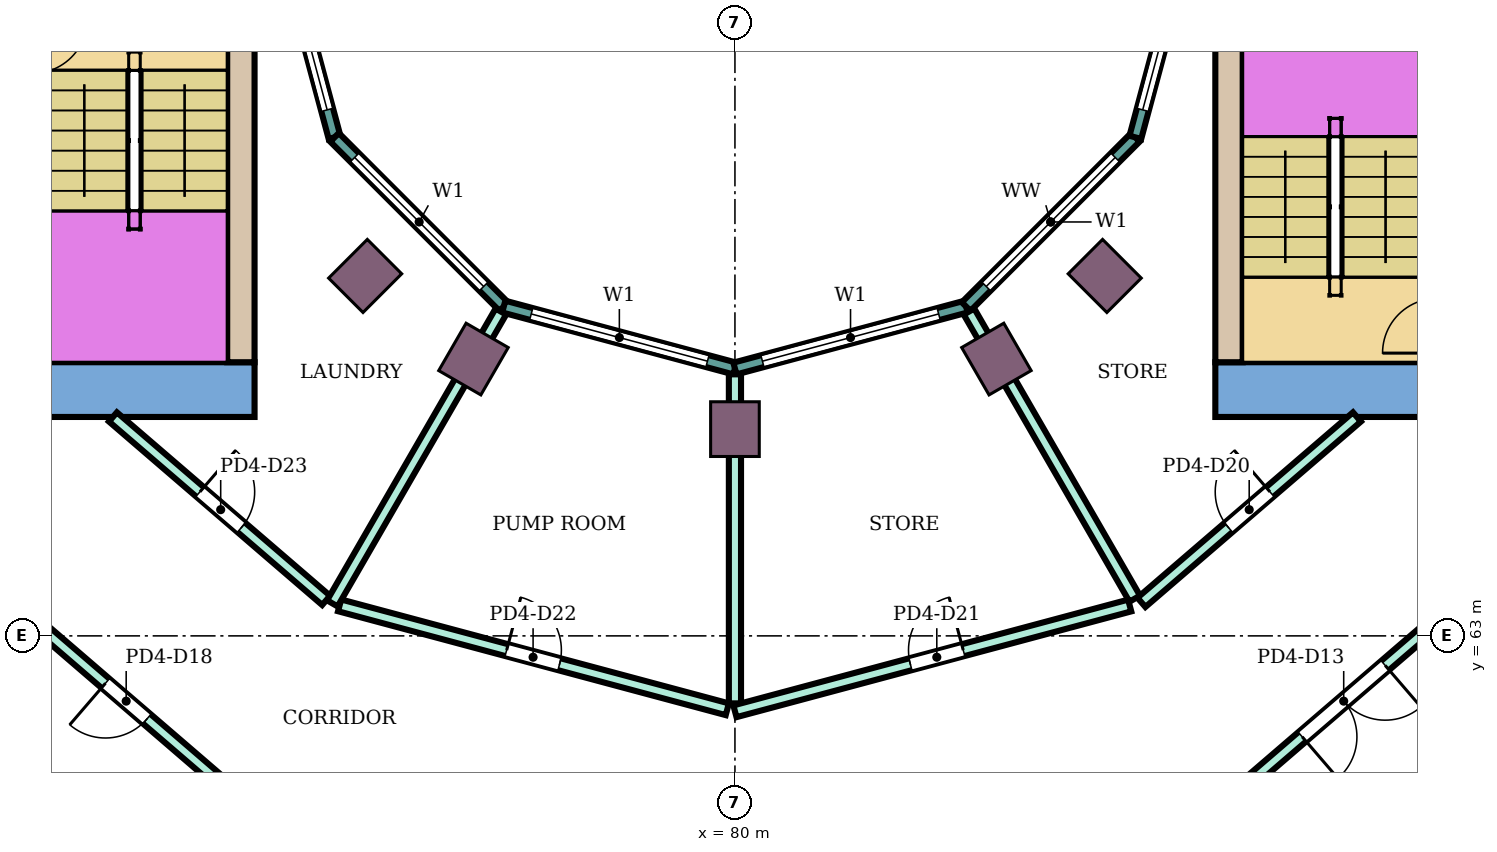
"""IFC4 building model, lengths in metres.
Left out: names, types, materials, properties, quantities, classifications, styles, units other than length and angle.
Written with IfcOpenShell. Run it as: python <this file> out.ifc"""

import sys

from ifc_helpers import new_model, si_unit, direction, frame, frame_2d, origin, origin_2d, place, context, subcontext, project, spatial, rectangle, extrude, element, fill, save


model = new_model("IFC4")
c1 = context("Model", 3, precision=1e-05, world=origin(), true_north=direction((0.0, 1.0)))
c2 = subcontext(c1, "Body", "Model", "MODEL_VIEW")
j1 = project(units=[si_unit("LENGTHUNIT", "METRE"), si_unit("PLANEANGLEUNIT", "RADIAN")], contexts=[c1])
p1 = place(None, origin())
s1 = spatial("IfcSite", under=j1, at=p1, CompositionType="ELEMENT")
p2 = place(p1, origin())
s2 = spatial("IfcBuilding", under=s1, at=p2, CompositionType="ELEMENT")
p3 = place(p2, frame((0.0, 0.0, 23.8)))
s3 = spatial("IfcBuildingStorey", under=s2, at=p3, CompositionType="ELEMENT", Elevation=23.8)
for number, where, z_axis, x_axis in (
    (1, (73.919, 68.919, 0.0), (0.0, 0.0, 1.0), (-0.707, -0.707, 0.0)),
    (2, (75.7, 67.552, 0.0), (0.0, 0.0, 1.0), (-0.5, -0.866, 0.0)),
    (3, (80.0, 66.4, 0.0), (0.0, 0.0, 1.0), (0.0, -1.0, 0.0)),
    (4, (84.3, 67.552, 0.0), (0.0, 0.0, 1.0), (0.5, -0.866, 0.0)),
    (5, (86.081, 68.919, 0.0), (0.0, 0.0, 1.0), (0.707, -0.707, 0.0)),
):
    element("IfcColumn", number, at=place(p3, frame(where, z_axis=z_axis, x_axis=x_axis)), inside=s3, PredefinedType="COLUMN", context=c2, shape_type="SweptSolid", body=[
        extrude(rectangle(XDim=0.9, YDim=0.8, at=origin_2d()), origin(), (0.0, 0.0, 1.0), 5.0),
    ])
p4 = place(p3, frame((87.9, 67.05, 0.0), z_axis=(0.0, 0.0, 1.0), x_axis=(1.0, 0.0, 0.0)))
e6 = element("IfcWall", 6, at=p4, inside=s3, PredefinedType="SHEAR", context=c2, shape_type="SweptSolid", body=[
    extrude(rectangle(XDim=14.6, YDim=0.9, at=frame_2d((7.3, 0.0))), origin(), (0.0, 0.0, 1.0), 4.68),
])
p5 = place(p4, frame((4.2, 0.0, 0.0)))
e7 = element("IfcOpeningElement", 7, at=p5, cuts=e6, PredefinedType="OPENING", context=c2, shape_type="SweptSolid", body=[
    extrude(rectangle(XDim=2.4, YDim=2.4, at=frame_2d((1.2, 1.2))), frame((0.0, 0.46, 0.0), z_axis=(0.0, -1.0, 0.0), x_axis=(1.0, 0.0, 0.0)), (0.0, 0.0, 1.0), 0.92),
])
p6 = place(p3, frame((88.125, 67.5, 0.0), z_axis=(0.0, 0.0, 1.0), x_axis=(0.0, 1.0, 0.0)))
e8 = element("IfcWall", 8, at=p6, inside=s3, PredefinedType="SHEAR", context=c2, shape_type="SweptSolid", body=[
    extrude(rectangle(XDim=7.5, YDim=0.45, at=frame_2d((3.75, 0.0))), origin(), (0.0, 0.0, 1.0), 4.68),
])
p7 = place(p3, frame((72.1, 67.05, 0.0), z_axis=(0.0, 0.0, 1.0), x_axis=(-1.0, 0.0, 0.0)))
e9 = element("IfcWall", 9, at=p7, inside=s3, PredefinedType="SHEAR", context=c2, shape_type="SweptSolid", body=[
    extrude(rectangle(XDim=14.6, YDim=0.9, at=frame_2d((7.3, 0.0))), origin(), (0.0, 0.0, 1.0), 4.68),
])
p8 = place(p7, frame((4.2, 0.0, 0.0)))
e10 = element("IfcOpeningElement", 10, at=p8, cuts=e9, PredefinedType="OPENING", context=c2, shape_type="SweptSolid", body=[
    extrude(rectangle(XDim=2.4, YDim=2.4, at=frame_2d((1.2, 1.2))), frame((0.0, 0.46, 0.0), z_axis=(0.0, -1.0, 0.0), x_axis=(1.0, 0.0, 0.0)), (0.0, 0.0, 1.0), 0.92),
])
p9 = place(p3, frame((71.875, 75.0, 0.0), z_axis=(0.0, 0.0, 1.0), x_axis=(0.0, -1.0, 0.0)))
e11 = element("IfcWall", 11, at=p9, inside=s3, PredefinedType="SHEAR", context=c2, shape_type="SweptSolid", body=[
    extrude(rectangle(XDim=7.5, YDim=0.45, at=frame_2d((3.75, 0.0))), origin(), (0.0, 0.0, 1.0), 4.68),
])
p10 = place(p3, frame((72.396, 75.0, 0.0), z_axis=(0.0, 0.0, 1.0), x_axis=(0.258789828301, -0.965933654434, 0.0)))
e12 = element("IfcWall", 12, at=p10, inside=s3, PredefinedType="NOTDEFINED", context=c2, shape_type="SweptSolid", body=[
    extrude(rectangle(XDim=3.936, YDim=0.2, at=frame_2d((1.968, 0.0))), origin(), (0.0, 0.0, 1.0), 5.0),
])
p11 = place(p10, frame((0.468, 0.0, 0.9)))
e13 = element("IfcOpeningElement", 13, at=p11, cuts=e12, PredefinedType="OPENING", context=c2, shape_type="SweptSolid", body=[
    extrude(rectangle(XDim=3.0, YDim=2.3, at=frame_2d((1.5, 1.15))), frame((0.0, 0.11, 0.0), z_axis=(0.0, -1.0, 0.0), x_axis=(1.0, 0.0, 0.0)), (0.0, 0.0, 1.0), 0.22),
])
p12 = place(p3, frame((73.415, 71.198, 0.0), z_axis=(0.0, 0.0, 1.0), x_axis=(0.707106781187, -0.707106781187, 0.0)))
e14 = element("IfcWall", 14, at=p12, inside=s3, PredefinedType="NOTDEFINED", context=c2, shape_type="SweptSolid", body=[
    extrude(rectangle(XDim=3.936, YDim=0.2, at=frame_2d((1.968, 0.0))), origin(), (0.0, 0.0, 1.0), 5.0),
])
p13 = place(p12, frame((0.468, 0.0, 0.9)))
e15 = element("IfcOpeningElement", 15, at=p13, cuts=e14, PredefinedType="OPENING", context=c2, shape_type="SweptSolid", body=[
    extrude(rectangle(XDim=3.0, YDim=2.3, at=frame_2d((1.5, 1.15))), frame((0.0, 0.11, 0.0), z_axis=(0.0, -1.0, 0.0), x_axis=(1.0, 0.0, 0.0)), (0.0, 0.0, 1.0), 0.22),
])
p14 = place(p3, frame((76.198, 68.415, 0.0), z_axis=(0.0, 0.0, 1.0), x_axis=(0.965933654434, -0.258789828301, 0.0)))
e16 = element("IfcWall", 16, at=p14, inside=s3, PredefinedType="NOTDEFINED", context=c2, shape_type="SweptSolid", body=[
    extrude(rectangle(XDim=3.936, YDim=0.2, at=frame_2d((1.968, 0.0))), origin(), (0.0, 0.0, 1.0), 5.0),
])
p15 = place(p14, frame((0.468, 0.0, 0.9)))
e17 = element("IfcOpeningElement", 17, at=p15, cuts=e16, PredefinedType="OPENING", context=c2, shape_type="SweptSolid", body=[
    extrude(rectangle(XDim=3.0, YDim=2.3, at=frame_2d((1.5, 1.15))), frame((0.0, 0.11, 0.0), z_axis=(0.0, -1.0, 0.0), x_axis=(1.0, 0.0, 0.0)), (0.0, 0.0, 1.0), 0.22),
])
p16 = place(p3, frame((80.0, 67.396, 0.0), z_axis=(0.0, 0.0, 1.0), x_axis=(0.965933654434, 0.258789828301, 0.0)))
e18 = element("IfcWall", 18, at=p16, inside=s3, PredefinedType="NOTDEFINED", context=c2, shape_type="SweptSolid", body=[
    extrude(rectangle(XDim=3.936, YDim=0.2, at=frame_2d((1.968, 0.0))), origin(), (0.0, 0.0, 1.0), 5.0),
])
p17 = place(p16, frame((0.468, 0.0, 0.9)))
e19 = element("IfcOpeningElement", 19, at=p17, cuts=e18, PredefinedType="OPENING", context=c2, shape_type="SweptSolid", body=[
    extrude(rectangle(XDim=3.0, YDim=2.3, at=frame_2d((1.5, 1.15))), frame((0.0, 0.11, 0.0), z_axis=(0.0, -1.0, 0.0), x_axis=(1.0, 0.0, 0.0)), (0.0, 0.0, 1.0), 0.22),
])
p18 = place(p3, frame((83.802, 68.415, 0.0), z_axis=(0.0, 0.0, 1.0), x_axis=(0.707106781187, 0.707106781187, 0.0)))
e20 = element("IfcWall", 20, at=p18, inside=s3, PredefinedType="NOTDEFINED", context=c2, shape_type="SweptSolid", body=[
    extrude(rectangle(XDim=3.936, YDim=0.2, at=frame_2d((1.968, 0.0))), origin(), (0.0, 0.0, 1.0), 5.0),
])
p19 = place(p18, frame((0.468, 0.0, 0.9)))
e21 = element("IfcOpeningElement", 21, at=p19, cuts=e20, PredefinedType="OPENING", context=c2, shape_type="SweptSolid", body=[
    extrude(rectangle(XDim=3.0, YDim=2.3, at=frame_2d((1.5, 1.15))), frame((0.0, 0.11, 0.0), z_axis=(0.0, -1.0, 0.0), x_axis=(1.0, 0.0, 0.0)), (0.0, 0.0, 1.0), 0.22),
])
p20 = place(p3, frame((86.585, 71.198, 0.0), z_axis=(0.0, 0.0, 1.0), x_axis=(0.258789828301, 0.965933654434, 0.0)))
e22 = element("IfcWall", 22, at=p20, inside=s3, PredefinedType="NOTDEFINED", context=c2, shape_type="SweptSolid", body=[
    extrude(rectangle(XDim=3.936, YDim=0.2, at=frame_2d((1.968, 0.0))), origin(), (0.0, 0.0, 1.0), 5.0),
])
p21 = place(p20, frame((0.468, 0.0, 0.9)))
e23 = element("IfcOpeningElement", 23, at=p21, cuts=e22, PredefinedType="OPENING", context=c2, shape_type="SweptSolid", body=[
    extrude(rectangle(XDim=3.0, YDim=2.3, at=frame_2d((1.5, 1.15))), frame((0.0, 0.11, 0.0), z_axis=(0.0, -1.0, 0.0), x_axis=(1.0, 0.0, 0.0)), (0.0, 0.0, 1.0), 0.22),
])
p22 = place(p3, frame((66.302, 65.1, 0.0), z_axis=(0.0, 0.0, 1.0), x_axis=(0.757895579626, -0.652375881209, 0.0)))
e24 = element("IfcWall", 24, at=p22, inside=s3, PredefinedType="PARTITIONING", context=c2, shape_type="SweptSolid", body=[
    extrude(rectangle(XDim=7.062, YDim=0.2, at=frame_2d((3.531, 0.0))), origin(), (0.0, 0.0, 1.0), 4.55),
])
p23 = place(p22, frame((4.414, 0.0, 0.0)))
e25 = element("IfcOpeningElement", 25, at=p23, cuts=e24, PredefinedType="OPENING", context=c2, shape_type="SweptSolid", body=[
    extrude(rectangle(XDim=0.9, YDim=2.1, at=frame_2d((0.45, 1.05))), frame((0.0, 0.11, 0.0), z_axis=(0.0, -1.0, 0.0), x_axis=(1.0, 0.0, 0.0)), (0.0, 0.0, 1.0), 0.22),
])
p24 = place(p22, frame((0.906, 0.0, 0.0)))
e26 = element("IfcOpeningElement", 26, at=p24, cuts=e24, PredefinedType="OPENING", context=c2, shape_type="SweptSolid", body=[
    extrude(rectangle(XDim=0.9, YDim=2.1, at=frame_2d((0.45, 1.05))), frame((0.0, 0.11, 0.0), z_axis=(0.0, -1.0, 0.0), x_axis=(1.0, 0.0, 0.0)), (0.0, 0.0, 1.0), 0.22),
])
p25 = place(p3, frame((69.771, 66.6, 0.0), z_axis=(0.0, 0.0, 1.0), x_axis=(0.758040611529, -0.652207352974, 0.0)))
e27 = element("IfcWall", 27, at=p25, inside=s3, PredefinedType="PARTITIONING", context=c2, shape_type="SweptSolid", body=[
    extrude(rectangle(XDim=4.625, YDim=0.2, at=frame_2d((2.312, 0.0))), origin(), (0.0, 0.0, 1.0), 4.55),
])
p26 = place(p25, frame((1.887, 0.0, 0.0)))
e28 = element("IfcOpeningElement", 28, at=p26, cuts=e27, PredefinedType="OPENING", context=c2, shape_type="SweptSolid", body=[
    extrude(rectangle(XDim=0.9, YDim=2.1, at=frame_2d((0.45, 1.05))), frame((0.0, 0.11, 0.0), z_axis=(0.0, -1.0, 0.0), x_axis=(1.0, 0.0, 0.0)), (0.0, 0.0, 1.0), 0.22),
])
p27 = place(p3, frame((73.499, 63.502, 0.0), z_axis=(0.0, 0.0, 1.0), x_axis=(0.965923617359, -0.258827288799, 0.0)))
e29 = element("IfcWall", 29, at=p27, inside=s3, PredefinedType="PARTITIONING", context=c2, shape_type="SweptSolid", body=[
    extrude(rectangle(XDim=6.601, YDim=0.2, at=frame_2d((3.3, 0.0))), origin(), (0.0, 0.0, 1.0), 4.55),
])
p28 = place(p27, frame((2.844, 0.0, 0.0)))
e30 = element("IfcOpeningElement", 30, at=p28, cuts=e29, PredefinedType="OPENING", context=c2, shape_type="SweptSolid", body=[
    extrude(rectangle(XDim=0.9, YDim=2.1, at=frame_2d((0.45, 1.05))), frame((0.0, 0.11, 0.0), z_axis=(0.0, -1.0, 0.0), x_axis=(1.0, 0.0, 0.0)), (0.0, 0.0, 1.0), 0.22),
])
p29 = place(p3, frame((73.379, 63.534, 0.0), z_axis=(0.0, 0.0, 1.0), x_axis=(0.500052970826, 0.865994818904, 0.0)))
e31 = element("IfcWall", 31, at=p29, inside=s3, PredefinedType="PARTITIONING", context=c2, shape_type="SweptSolid", body=[
    extrude(rectangle(XDim=5.542, YDim=0.2, at=frame_2d((2.771, 0.0))), origin(), (0.0, 0.0, 1.0), 4.55),
])
p30 = place(p3, frame((80.0, 61.89, 0.0), z_axis=(0.0, 0.0, 1.0), x_axis=(0.0, 1.0, 0.0)))
e32 = element("IfcWall", 32, at=p30, inside=s3, PredefinedType="PARTITIONING", context=c2, shape_type="SweptSolid", body=[
    extrude(rectangle(XDim=5.411, YDim=0.2, at=frame_2d((2.706, 0.0))), origin(), (0.0, 0.0, 1.0), 4.55),
])
p31 = place(p3, frame((80.0, 61.76, 0.0), z_axis=(0.0, 0.0, 1.0), x_axis=(0.965932810031, 0.258792980017, 0.0)))
e33 = element("IfcWall", 33, at=p31, inside=s3, PredefinedType="PARTITIONING", context=c2, shape_type="SweptSolid", body=[
    extrude(rectangle(XDim=6.721, YDim=0.2, at=frame_2d((3.36, 0.0))), origin(), (0.0, 0.0, 1.0), 4.55),
])
p32 = place(p31, frame((2.987, 0.0, 0.0)))
e34 = element("IfcOpeningElement", 34, at=p32, cuts=e33, PredefinedType="OPENING", context=c2, shape_type="SweptSolid", body=[
    extrude(rectangle(XDim=0.9, YDim=2.1, at=frame_2d((0.45, 1.05))), frame((0.0, 0.11, 0.0), z_axis=(0.0, -1.0, 0.0), x_axis=(1.0, 0.0, 0.0)), (0.0, 0.0, 1.0), 0.22),
])
p33 = place(p3, frame((83.849, 68.333, 0.0), z_axis=(0.0, 0.0, 1.0), x_axis=(0.500006734102, -0.866021515814, 0.0)))
e35 = element("IfcWall", 35, at=p33, inside=s3, PredefinedType="PARTITIONING", context=c2, shape_type="SweptSolid", body=[
    extrude(rectangle(XDim=5.452, YDim=0.2, at=frame_2d((2.726, 0.0))), origin(), (0.0, 0.0, 1.0), 4.55),
])
p34 = place(p3, frame((86.685, 63.551, 0.0), z_axis=(0.0, 0.0, 1.0), x_axis=(0.758049900748, 0.652196556244, 0.0)))
e36 = element("IfcWall", 36, at=p34, inside=s3, PredefinedType="PARTITIONING", context=c2, shape_type="SweptSolid", body=[
    extrude(rectangle(XDim=4.675, YDim=0.2, at=frame_2d((2.337, 0.0))), origin(), (0.0, 0.0, 1.0), 4.55),
])
p35 = place(p34, frame((1.887, 0.0, 0.0)))
e37 = element("IfcOpeningElement", 37, at=p35, cuts=e36, PredefinedType="OPENING", context=c2, shape_type="SweptSolid", body=[
    extrude(rectangle(XDim=0.9, YDim=2.1, at=frame_2d((0.45, 1.05))), frame((0.0, 0.11, 0.0), z_axis=(0.0, -1.0, 0.0), x_axis=(1.0, 0.0, 0.0)), (0.0, 0.0, 1.0), 0.22),
])
p36 = place(p3, frame((88.436, 60.573, 0.0), z_axis=(0.0, 0.0, 1.0), x_axis=(0.758186248639, 0.652038045189, 0.0)))
e38 = element("IfcWall", 38, at=p36, inside=s3, PredefinedType="PARTITIONING", context=c2, shape_type="SweptSolid", body=[
    extrude(rectangle(XDim=6.882, YDim=0.2, at=frame_2d((3.441, 0.0))), origin(), (0.0, 0.0, 1.0), 4.55),
])
p37 = place(p36, frame((4.835, 0.0, 0.0)))
e39 = element("IfcOpeningElement", 39, at=p37, cuts=e38, PredefinedType="OPENING", context=c2, shape_type="SweptSolid", body=[
    extrude(rectangle(XDim=1.8, YDim=2.1, at=frame_2d((0.9, 1.05))), frame((0.0, 0.11, 0.0), z_axis=(0.0, -1.0, 0.0), x_axis=(1.0, 0.0, 0.0)), (0.0, 0.0, 1.0), 0.22),
])
p38 = place(p36, frame((1.177, 0.0, 0.0)))
e40 = element("IfcOpeningElement", 40, at=p38, cuts=e38, PredefinedType="OPENING", context=c2, shape_type="SweptSolid", body=[
    extrude(rectangle(XDim=1.8, YDim=2.1, at=frame_2d((0.9, 1.05))), frame((0.0, 0.11, 0.0), z_axis=(0.0, -1.0, 0.0), x_axis=(1.0, 0.0, 0.0)), (0.0, 0.0, 1.0), 0.22),
])
p39 = place(p11, origin())
e41 = element("IfcWindow", 41, at=p39, inside=s3, PartitioningType="SINGLE_PANEL", PredefinedType="WINDOW", context=c2, shape_type="SweptSolid", body=[
    extrude(rectangle(XDim=3.0, YDim=2.3, at=frame_2d((1.5, 1.15))), frame((0.0, 0.03, 0.0), z_axis=(0.0, -1.0, 0.0), x_axis=(1.0, 0.0, 0.0)), (0.0, 0.0, 1.0), 0.06),
])
fill(e13, e41)
p40 = place(p13, origin())
e42 = element("IfcWindow", 42, at=p40, inside=s3, PartitioningType="SINGLE_PANEL", PredefinedType="WINDOW", context=c2, shape_type="SweptSolid", body=[
    extrude(rectangle(XDim=3.0, YDim=2.3, at=frame_2d((1.5, 1.15))), frame((0.0, 0.03, 0.0), z_axis=(0.0, -1.0, 0.0), x_axis=(1.0, 0.0, 0.0)), (0.0, 0.0, 1.0), 0.06),
])
fill(e15, e42)
p41 = place(p15, origin())
e43 = element("IfcWindow", 43, at=p41, inside=s3, PartitioningType="SINGLE_PANEL", PredefinedType="WINDOW", context=c2, shape_type="SweptSolid", body=[
    extrude(rectangle(XDim=3.0, YDim=2.3, at=frame_2d((1.5, 1.15))), frame((0.0, 0.03, 0.0), z_axis=(0.0, -1.0, 0.0), x_axis=(1.0, 0.0, 0.0)), (0.0, 0.0, 1.0), 0.06),
])
fill(e17, e43)
p42 = place(p17, origin())
e44 = element("IfcWindow", 44, at=p42, inside=s3, PartitioningType="SINGLE_PANEL", PredefinedType="WINDOW", context=c2, shape_type="SweptSolid", body=[
    extrude(rectangle(XDim=3.0, YDim=2.3, at=frame_2d((1.5, 1.15))), frame((0.0, 0.03, 0.0), z_axis=(0.0, -1.0, 0.0), x_axis=(1.0, 0.0, 0.0)), (0.0, 0.0, 1.0), 0.06),
])
fill(e19, e44)
p43 = place(p19, origin())
e45 = element("IfcWindow", 45, at=p43, inside=s3, PartitioningType="SINGLE_PANEL", PredefinedType="WINDOW", context=c2, shape_type="SweptSolid", body=[
    extrude(rectangle(XDim=3.0, YDim=2.3, at=frame_2d((1.5, 1.15))), frame((0.0, 0.03, 0.0), z_axis=(0.0, -1.0, 0.0), x_axis=(1.0, 0.0, 0.0)), (0.0, 0.0, 1.0), 0.06),
])
fill(e21, e45)
p44 = place(p21, origin())
e46 = element("IfcWindow", 46, at=p44, inside=s3, PartitioningType="SINGLE_PANEL", PredefinedType="WINDOW", context=c2, shape_type="SweptSolid", body=[
    extrude(rectangle(XDim=3.0, YDim=2.3, at=frame_2d((1.5, 1.15))), frame((0.0, 0.03, 0.0), z_axis=(0.0, -1.0, 0.0), x_axis=(1.0, 0.0, 0.0)), (0.0, 0.0, 1.0), 0.06),
])
fill(e23, e46)
p45 = place(p38, frame((1.8, 0.0, 0.0), z_axis=(0.0, 0.0, 1.0), x_axis=(-1.0, 0.0, 0.0)))
e47 = element("IfcDoor", 47, at=p45, inside=s3, OperationType="DOUBLE_DOOR_SINGLE_SWING", PredefinedType="DOOR", context=c2, shape_type="SweptSolid", body=[
    extrude(rectangle(XDim=1.8, YDim=2.1, at=frame_2d((0.9, 1.05))), frame((0.0, 0.025, 0.0), z_axis=(0.0, -1.0, 0.0), x_axis=(1.0, 0.0, 0.0)), (0.0, 0.0, 1.0), 0.05),
])
fill(e40, e47)
p46 = place(p23, frame((0.9, 0.0, 0.0), z_axis=(0.0, 0.0, 1.0), x_axis=(-1.0, 0.0, 0.0)))
e48 = element("IfcDoor", 48, at=p46, inside=s3, OperationType="SINGLE_SWING_RIGHT", PredefinedType="DOOR", context=c2, shape_type="SweptSolid", body=[
    extrude(rectangle(XDim=0.9, YDim=2.1, at=frame_2d((0.45, 1.05))), frame((0.0, 0.025, 0.0), z_axis=(0.0, -1.0, 0.0), x_axis=(1.0, 0.0, 0.0)), (0.0, 0.0, 1.0), 0.05),
])
fill(e25, e48)
p47 = place(p35, origin())
e49 = element("IfcDoor", 49, at=p47, inside=s3, OperationType="SINGLE_SWING_RIGHT", PredefinedType="DOOR", context=c2, shape_type="SweptSolid", body=[
    extrude(rectangle(XDim=0.9, YDim=2.1, at=frame_2d((0.45, 1.05))), frame((0.0, 0.025, 0.0), z_axis=(0.0, -1.0, 0.0), x_axis=(1.0, 0.0, 0.0)), (0.0, 0.0, 1.0), 0.05),
])
fill(e37, e49)
p48 = place(p32, origin())
e50 = element("IfcDoor", 50, at=p48, inside=s3, OperationType="SINGLE_SWING_RIGHT", PredefinedType="DOOR", context=c2, shape_type="SweptSolid", body=[
    extrude(rectangle(XDim=0.9, YDim=2.1, at=frame_2d((0.45, 1.05))), frame((0.0, 0.025, 0.0), z_axis=(0.0, -1.0, 0.0), x_axis=(1.0, 0.0, 0.0)), (0.0, 0.0, 1.0), 0.05),
])
fill(e34, e50)
p49 = place(p28, origin())
e51 = element("IfcDoor", 51, at=p49, inside=s3, OperationType="SINGLE_SWING_LEFT", PredefinedType="DOOR", context=c2, shape_type="SweptSolid", body=[
    extrude(rectangle(XDim=0.9, YDim=2.1, at=frame_2d((0.45, 1.05))), frame((0.0, 0.025, 0.0), z_axis=(0.0, -1.0, 0.0), x_axis=(1.0, 0.0, 0.0)), (0.0, 0.0, 1.0), 0.05),
])
fill(e30, e51)
p50 = place(p26, origin())
e52 = element("IfcDoor", 52, at=p50, inside=s3, OperationType="SINGLE_SWING_LEFT", PredefinedType="DOOR", context=c2, shape_type="SweptSolid", body=[
    extrude(rectangle(XDim=0.9, YDim=2.1, at=frame_2d((0.45, 1.05))), frame((0.0, 0.025, 0.0), z_axis=(0.0, -1.0, 0.0), x_axis=(1.0, 0.0, 0.0)), (0.0, 0.0, 1.0), 0.05),
])
fill(e28, e52)
save(model, sys.argv[1])
